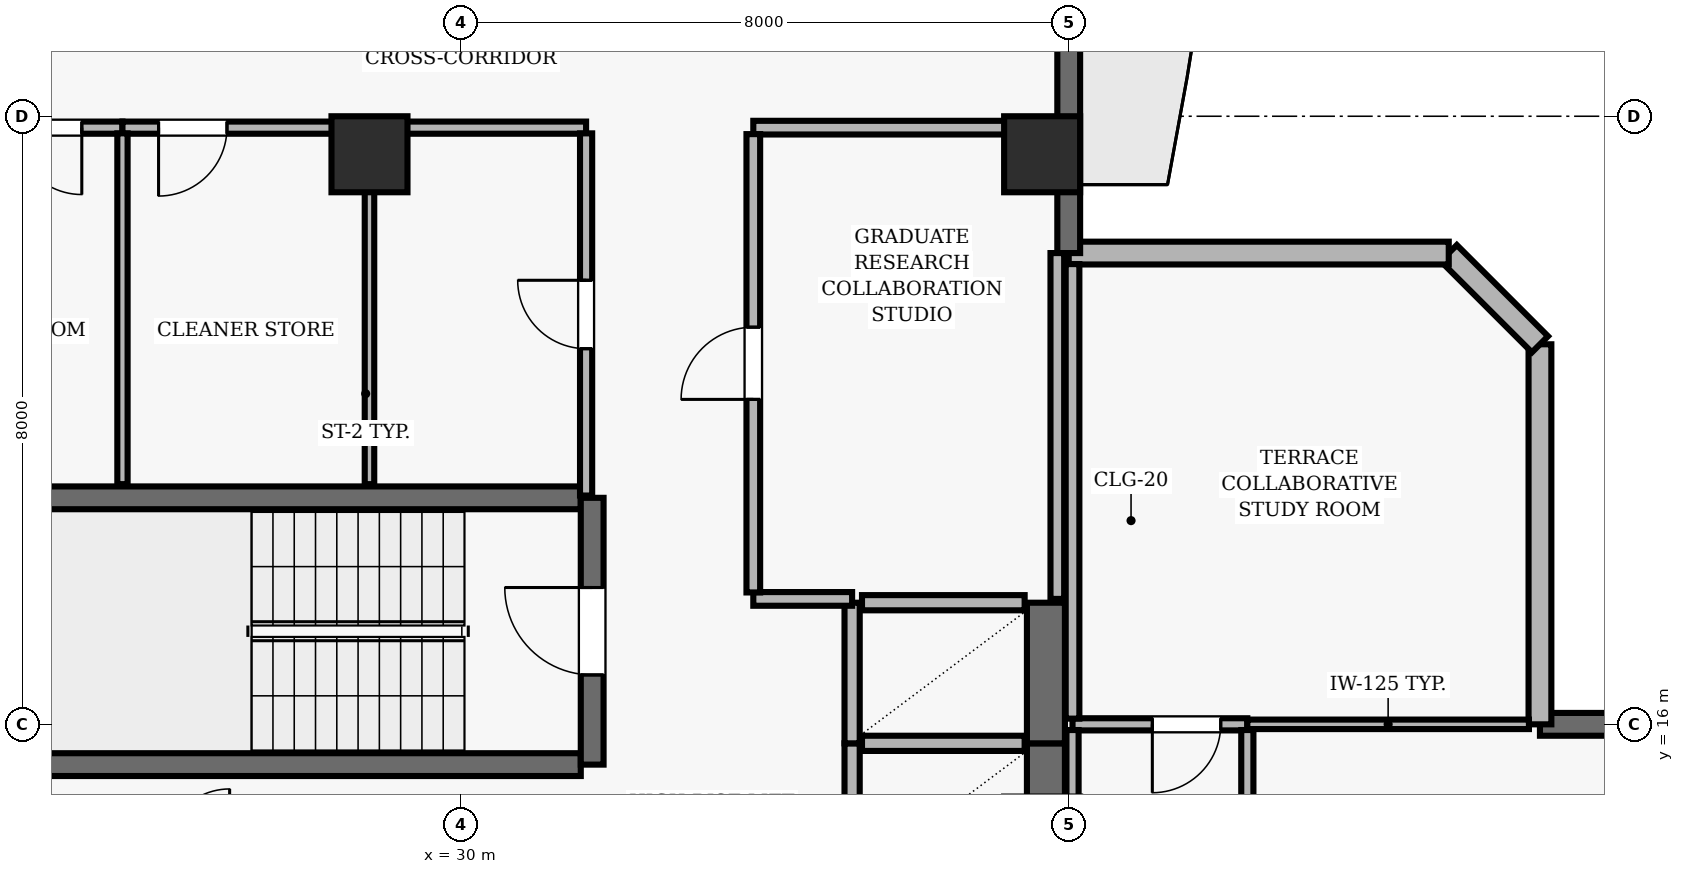
"""IFC4 building model, lengths in metres.
Left out: names, types, materials, properties, quantities, classifications, styles, units other than length and angle.
Written with IfcOpenShell. Run it as: python <this file> out.ifc"""

import sys

from ifc_helpers import new_model, si_unit, direction, frame, frame_2d, origin, origin_2d, place, context, subcontext, project, spatial, rectangle, extrude, element, fill, save


model = new_model("IFC4")
c1 = context("Model", 3, precision=1e-05, world=origin(), true_north=direction((0.0, 1.0)))
c2 = subcontext(c1, "Body", "Model", "MODEL_VIEW")
j1 = project(units=[si_unit("LENGTHUNIT", "METRE"), si_unit("PLANEANGLEUNIT", "RADIAN")], contexts=[c1])
p1 = place(None, origin())
s1 = spatial("IfcSite", under=j1, at=p1, CompositionType="ELEMENT")
p2 = place(p1, origin())
s2 = spatial("IfcBuilding", under=s1, at=p2, CompositionType="ELEMENT")
p3 = place(p2, frame((0.0, 0.0, 218.7)))
s3 = spatial("IfcBuildingStorey", under=s2, at=p3, CompositionType="ELEMENT", Elevation=218.7)
for number, where, z_axis, x_axis in (
    (1, (28.8, 23.5, 0.0), (0.0, 0.0, 1.0), (1.0, 0.0, 0.0)),
    (2, (37.65, 23.5, 0.0), (0.0, 0.0, 1.0), (1.0, 0.0, 0.0)),
):
    element("IfcColumn", number, at=place(p3, frame(where, z_axis=z_axis, x_axis=x_axis)), inside=s3, PredefinedType="COLUMN", context=c2, shape_type="SweptSolid", body=[
        extrude(rectangle(XDim=1.0, YDim=1.0, at=origin_2d()), origin(), (0.0, 0.0, 1.0), 3.9),
    ])
p4 = place(p3, frame((62.7, 16.0, 0.0), z_axis=(0.0, 0.0, 1.0), x_axis=(-1.0, 0.0, 0.0)))
e3 = element("IfcWall", 3, at=p4, inside=s3, PredefinedType="SOLIDWALL", context=c2, shape_type="SweptSolid", body=[
    extrude(rectangle(XDim=18.5, YDim=0.3, at=frame_2d((9.25, 0.0))), origin(), (0.0, 0.0, 1.0), 3.69),
])
p5 = place(p4, frame((7.55, 0.0, 0.0)))
e4 = element("IfcOpeningElement", 4, at=p5, cuts=e3, PredefinedType="OPENING", context=c2, shape_type="SweptSolid", body=[
    extrude(rectangle(XDim=1.0, YDim=2.2, at=frame_2d((0.5, 1.1))), frame((0.0, 0.16, 0.0), z_axis=(0.0, -1.0, 0.0), x_axis=(1.0, 0.0, 0.0)), (0.0, 0.0, 1.0), 0.32),
])
p6 = place(p4, frame((2.183, 0.0, 0.9)))
e5 = element("IfcOpeningElement", 5, at=p6, cuts=e3, PredefinedType="OPENING", context=c2, shape_type="SweptSolid", body=[
    extrude(rectangle(XDim=1.8, YDim=2.2, at=frame_2d((0.9, 1.1))), frame((0.0, 0.16, 0.0), z_axis=(0.0, -1.0, 0.0), x_axis=(1.0, 0.0, 0.0)), (0.0, 0.0, 1.0), 0.32),
])
p7 = place(p4, frame((9.25, 0.0, 0.9)))
e6 = element("IfcOpeningElement", 6, at=p7, cuts=e3, PredefinedType="OPENING", context=c2, shape_type="SweptSolid", body=[
    extrude(rectangle(XDim=1.8, YDim=2.2, at=frame_2d((0.9, 1.1))), frame((0.0, 0.16, 0.0), z_axis=(0.0, -1.0, 0.0), x_axis=(1.0, 0.0, 0.0)), (0.0, 0.0, 1.0), 0.32),
])
p8 = place(p4, frame((14.517, 0.0, 0.9)))
e7 = element("IfcOpeningElement", 7, at=p8, cuts=e3, PredefinedType="OPENING", context=c2, shape_type="SweptSolid", body=[
    extrude(rectangle(XDim=1.8, YDim=2.2, at=frame_2d((0.9, 1.1))), frame((0.0, 0.16, 0.0), z_axis=(0.0, -1.0, 0.0), x_axis=(1.0, 0.0, 0.0)), (0.0, 0.0, 1.0), 0.32),
])
p9 = place(p3, frame((44.2, 16.0, 0.0), z_axis=(0.0, 0.0, 1.0), x_axis=(0.0, 1.0, 0.0)))
e8 = element("IfcWall", 8, at=p9, inside=s3, PredefinedType="SOLIDWALL", context=c2, shape_type="SweptSolid", body=[
    extrude(rectangle(XDim=5.0, YDim=0.3, at=frame_2d((2.5, 0.0))), origin(), (0.0, 0.0, 1.0), 3.69),
])
p10 = place(p3, frame((44.2, 21.0, 0.0), z_axis=(0.0, 0.0, 1.0), x_axis=(-0.707106781187, 0.707106781187, 0.0)))
e9 = element("IfcWall", 9, at=p10, inside=s3, PredefinedType="SOLIDWALL", context=c2, shape_type="SweptSolid", body=[
    extrude(rectangle(XDim=1.697, YDim=0.3, at=frame_2d((0.849, 0.0))), origin(), (0.0, 0.0, 1.0), 3.69),
])
p11 = place(p3, frame((43.0, 22.2, 0.0), z_axis=(0.0, 0.0, 1.0), x_axis=(-1.0, 0.0, 0.0)))
e10 = element("IfcWall", 10, at=p11, inside=s3, PredefinedType="SOLIDWALL", context=c2, shape_type="SweptSolid", body=[
    extrude(rectangle(XDim=5.0, YDim=0.3, at=frame_2d((2.5, 0.0))), origin(), (0.0, 0.0, 1.0), 3.69),
])
p12 = place(p3, frame((38.0, 22.2, 0.0), z_axis=(0.0, 0.0, 1.0), x_axis=(0.0, 1.0, 0.0)))
e11 = element("IfcWall", 11, at=p12, inside=s3, PredefinedType="SOLIDWALL", context=c2, shape_type="SweptSolid", body=[
    extrude(rectangle(XDim=18.5, YDim=0.3, at=frame_2d((9.25, 0.0))), origin(), (0.0, 0.0, 1.0), 3.69),
])
p13 = place(p12, frame((9.95, 0.0, 0.0)))
e12 = element("IfcOpeningElement", 12, at=p13, cuts=e11, PredefinedType="OPENING", context=c2, shape_type="SweptSolid", body=[
    extrude(rectangle(XDim=1.0, YDim=2.2, at=frame_2d((0.5, 1.1))), frame((0.0, 0.16, 0.0), z_axis=(0.0, -1.0, 0.0), x_axis=(1.0, 0.0, 0.0)), (0.0, 0.0, 1.0), 0.32),
])
p14 = place(p12, frame((14.667, 0.0, 0.9)))
e13 = element("IfcOpeningElement", 13, at=p14, cuts=e11, PredefinedType="OPENING", context=c2, shape_type="SweptSolid", body=[
    extrude(rectangle(XDim=1.5, YDim=1.6, at=frame_2d((0.75, 0.8))), frame((0.0, 0.16, 0.0), z_axis=(0.0, -1.0, 0.0), x_axis=(1.0, 0.0, 0.0)), (0.0, 0.0, 1.0), 0.32),
])
for number, where, z_axis, x_axis in (
    (14, (31.58, 18.98, 0.0), (0.0, 0.0, 1.0), (-1.0, 0.0, 0.0)),
    (15, (23.22, 15.47, 0.0), (0.0, 0.0, 1.0), (1.0, 0.0, 0.0)),
):
    element("IfcWall", number, at=place(p3, frame(where, z_axis=z_axis, x_axis=x_axis)), inside=s3, PredefinedType="SHEAR", context=c2, shape_type="SweptSolid", body=[
        extrude(rectangle(XDim=8.36, YDim=0.3, at=frame_2d((4.18, 0.0))), origin(), (0.0, 0.0, 1.0), 3.69),
    ])
p15 = place(p3, frame((31.73, 15.47, 0.0), z_axis=(0.0, 0.0, 1.0), x_axis=(0.0, 1.0, 0.0)))
e16 = element("IfcWall", 16, at=p15, inside=s3, PredefinedType="SHEAR", context=c2, shape_type="SweptSolid", body=[
    extrude(rectangle(XDim=3.51, YDim=0.3, at=frame_2d((1.755, 0.0))), origin(), (0.0, 0.0, 1.0), 3.69),
])
p16 = place(p15, frame((1.18, 0.0, 0.0)))
e17 = element("IfcOpeningElement", 17, at=p16, cuts=e16, PredefinedType="OPENING", context=c2, shape_type="SweptSolid", body=[
    extrude(rectangle(XDim=1.15, YDim=2.15, at=frame_2d((0.575, 1.075))), frame((0.0, 0.16, 0.0), z_axis=(0.0, -1.0, 0.0), x_axis=(1.0, 0.0, 0.0)), (0.0, 0.0, 1.0), 0.32),
])
p17 = place(p3, frame((35.15, 15.75, 0.0), z_axis=(0.0, 0.0, 1.0), x_axis=(0.0, -1.0, 0.0)))
e18 = element("IfcWall", 18, at=p17, inside=s3, PredefinedType="SOLIDWALL", context=c2, shape_type="SweptSolid", body=[
    extrude(rectangle(XDim=1.85, YDim=0.2, at=frame_2d((0.925, 0.0))), origin(), (0.0, 0.0, 1.0), 3.69),
])
p18 = place(p3, frame((37.7, 13.9, 0.0), z_axis=(0.0, 0.0, 1.0), x_axis=(0.0, 1.0, 0.0)))
e19 = element("IfcWall", 19, at=p18, inside=s3, PredefinedType="SHEAR", context=c2, shape_type="SweptSolid", body=[
    extrude(rectangle(XDim=1.85, YDim=0.5, at=frame_2d((0.925, 0.0))), origin(), (0.0, 0.0, 1.0), 3.69),
])
p19 = place(p3, frame((37.42, 15.75, 0.0), z_axis=(0.0, 0.0, 1.0), x_axis=(-1.0, 0.0, 0.0)))
e20 = element("IfcWall", 20, at=p19, inside=s3, PredefinedType="SOLIDWALL", context=c2, shape_type="SweptSolid", body=[
    extrude(rectangle(XDim=2.14, YDim=0.2, at=frame_2d((1.07, 0.0))), origin(), (0.0, 0.0, 1.0), 3.69),
])
p20 = place(p3, frame((35.15, 17.6, 0.0), z_axis=(0.0, 0.0, 1.0), x_axis=(0.0, -1.0, 0.0)))
e21 = element("IfcWall", 21, at=p20, inside=s3, PredefinedType="SOLIDWALL", context=c2, shape_type="SweptSolid", body=[
    extrude(rectangle(XDim=1.85, YDim=0.2, at=frame_2d((0.925, 0.0))), origin(), (0.0, 0.0, 1.0), 3.69),
])
p21 = place(p3, frame((37.7, 15.75, 0.0), z_axis=(0.0, 0.0, 1.0), x_axis=(0.0, 1.0, 0.0)))
e22 = element("IfcWall", 22, at=p21, inside=s3, PredefinedType="SHEAR", context=c2, shape_type="SweptSolid", body=[
    extrude(rectangle(XDim=1.85, YDim=0.5, at=frame_2d((0.925, 0.0))), origin(), (0.0, 0.0, 1.0), 3.69),
])
p22 = place(p3, frame((37.42, 17.6, 0.0), z_axis=(0.0, 0.0, 1.0), x_axis=(-1.0, 0.0, 0.0)))
e23 = element("IfcWall", 23, at=p22, inside=s3, PredefinedType="SOLIDWALL", context=c2, shape_type="SweptSolid", body=[
    extrude(rectangle(XDim=2.14, YDim=0.2, at=frame_2d((1.07, 0.0))), origin(), (0.0, 0.0, 1.0), 3.69),
])
p23 = place(p3, frame((25.55, 23.85, 0.0), z_axis=(0.0, 0.0, 1.0), x_axis=(-1.0, 0.0, 0.0)))
e24 = element("IfcWall", 24, at=p23, inside=s3, PredefinedType="PARTITIONING", context=c2, shape_type="SweptSolid", body=[
    extrude(rectangle(XDim=3.35, YDim=0.16, at=frame_2d((1.675, 0.0))), origin(), (0.0, 0.0, 1.0), 3.146),
])
p24 = place(p23, frame((0.535, 0.0, 0.0)))
e25 = element("IfcOpeningElement", 25, at=p24, cuts=e24, PredefinedType="OPENING", context=c2, shape_type="SweptSolid", body=[
    extrude(rectangle(XDim=0.88, YDim=2.1, at=frame_2d((0.44, 1.05))), frame((0.0, 0.09, 0.0), z_axis=(0.0, -1.0, 0.0), x_axis=(1.0, 0.0, 0.0)), (0.0, 0.0, 1.0), 0.18),
])
p25 = place(p3, frame((28.8, 23.85, 0.0), z_axis=(0.0, 0.0, 1.0), x_axis=(-1.0, 0.0, 0.0)))
e26 = element("IfcWall", 26, at=p25, inside=s3, PredefinedType="PARTITIONING", context=c2, shape_type="SweptSolid", body=[
    extrude(rectangle(XDim=3.25, YDim=0.16, at=frame_2d((1.625, 0.0))), origin(), (0.0, 0.0, 1.0), 3.146),
])
p26 = place(p25, frame((1.875, 0.0, 0.0)))
e27 = element("IfcOpeningElement", 27, at=p26, cuts=e26, PredefinedType="OPENING", context=c2, shape_type="SweptSolid", body=[
    extrude(rectangle(XDim=0.9, YDim=2.1, at=frame_2d((0.45, 1.05))), frame((0.0, 0.09, 0.0), z_axis=(0.0, -1.0, 0.0), x_axis=(1.0, 0.0, 0.0)), (0.0, 0.0, 1.0), 0.18),
])
p27 = place(p3, frame((31.65, 23.85, 0.0), z_axis=(0.0, 0.0, 1.0), x_axis=(-1.0, 0.0, 0.0)))
e28 = element("IfcWall", 28, at=p27, inside=s3, PredefinedType="PARTITIONING", context=c2, shape_type="SweptSolid", body=[
    extrude(rectangle(XDim=2.85, YDim=0.16, at=frame_2d((1.425, 0.0))), origin(), (0.0, 0.0, 1.0), 3.146),
])
p28 = place(p3, frame((33.85, 17.65, 0.0), z_axis=(0.0, 0.0, 1.0), x_axis=(1.0, 0.0, 0.0)))
e29 = element("IfcWall", 29, at=p28, inside=s3, PredefinedType="PARTITIONING", context=c2, shape_type="SweptSolid", body=[
    extrude(rectangle(XDim=1.3, YDim=0.18, at=frame_2d((0.65, 0.0))), origin(), (0.0, 0.0, 1.0), 3.69),
])
p29 = place(p3, frame((37.85, 23.85, 0.0), z_axis=(0.0, 0.0, 1.0), x_axis=(-1.0, 0.0, 0.0)))
e30 = element("IfcWall", 30, at=p29, inside=s3, PredefinedType="PARTITIONING", context=c2, shape_type="SweptSolid", body=[
    extrude(rectangle(XDim=4.0, YDim=0.18, at=frame_2d((2.0, 0.0))), origin(), (0.0, 0.0, 1.0), 3.146),
])
p30 = place(p3, frame((40.35, 16.0, 0.0), z_axis=(0.0, 0.0, 1.0), x_axis=(-1.0, 0.0, 0.0)))
e31 = element("IfcWall", 31, at=p30, inside=s3, PredefinedType="PARTITIONING", context=c2, shape_type="SweptSolid", body=[
    extrude(rectangle(XDim=2.3, YDim=0.16, at=frame_2d((1.15, 0.0))), origin(), (0.0, 0.0, 1.0), 3.39),
])
p31 = place(p30, frame((0.35, 0.0, 0.0)))
e32 = element("IfcOpeningElement", 32, at=p31, cuts=e31, PredefinedType="OPENING", context=c2, shape_type="SweptSolid", body=[
    extrude(rectangle(XDim=0.9, YDim=2.1, at=frame_2d((0.45, 1.05))), frame((0.0, 0.09, 0.0), z_axis=(0.0, -1.0, 0.0), x_axis=(1.0, 0.0, 0.0)), (0.0, 0.0, 1.0), 0.18),
])
p32 = place(p3, frame((40.35, 16.0, 0.0), z_axis=(0.0, 0.0, 1.0), x_axis=(1.0, 0.0, 0.0)))
e33 = element("IfcWall", 33, at=p32, inside=s3, PredefinedType="PARTITIONING", context=c2, shape_type="SweptSolid", body=[
    extrude(rectangle(XDim=3.705, YDim=0.125, at=frame_2d((1.853, 0.0))), origin(), (0.0, 0.0, 1.0), 3.39),
])
p33 = place(p3, frame((25.55, 19.16, 0.0), z_axis=(0.0, 0.0, 1.0), x_axis=(0.0, 1.0, 0.0)))
e34 = element("IfcWall", 34, at=p33, inside=s3, PredefinedType="PARTITIONING", context=c2, shape_type="SweptSolid", body=[
    extrude(rectangle(XDim=4.615, YDim=0.135, at=frame_2d((2.308, 0.0))), origin(), (0.0, 0.0, 1.0), 3.69),
])
p34 = place(p3, frame((28.8, 23.775, 0.0), z_axis=(0.0, 0.0, 1.0), x_axis=(0.0, -1.0, 0.0)))
e35 = element("IfcWall", 35, at=p34, inside=s3, PredefinedType="PARTITIONING", context=c2, shape_type="SweptSolid", body=[
    extrude(rectangle(XDim=4.615, YDim=0.125, at=frame_2d((2.308, 0.0))), origin(), (0.0, 0.0, 1.0), 3.69),
])
p35 = place(p3, frame((31.65, 19.01, 0.0), z_axis=(0.0, 0.0, 1.0), x_axis=(0.0, 1.0, 0.0)))
e36 = element("IfcWall", 36, at=p35, inside=s3, PredefinedType="PARTITIONING", context=c2, shape_type="SweptSolid", body=[
    extrude(rectangle(XDim=4.765, YDim=0.16, at=frame_2d((2.382, 0.0))), origin(), (0.0, 0.0, 1.0), 3.69),
])
p36 = place(p35, frame((1.932, 0.0, 0.0)))
e37 = element("IfcOpeningElement", 37, at=p36, cuts=e36, PredefinedType="OPENING", context=c2, shape_type="SweptSolid", body=[
    extrude(rectangle(XDim=0.9, YDim=2.1, at=frame_2d((0.45, 1.05))), frame((0.0, 0.09, 0.0), z_axis=(0.0, -1.0, 0.0), x_axis=(1.0, 0.0, 0.0)), (0.0, 0.0, 1.0), 0.18),
])
p37 = place(p3, frame((33.85, 17.735, 0.0), z_axis=(0.0, 0.0, 1.0), x_axis=(0.0, 1.0, 0.0)))
e38 = element("IfcWall", 38, at=p37, inside=s3, PredefinedType="PARTITIONING", context=c2, shape_type="SweptSolid", body=[
    extrude(rectangle(XDim=6.03, YDim=0.18, at=frame_2d((3.015, 0.0))), origin(), (0.0, 0.0, 1.0), 3.69),
])
p38 = place(p37, frame((2.54, 0.0, 0.0)))
e39 = element("IfcOpeningElement", 39, at=p38, cuts=e38, PredefinedType="OPENING", context=c2, shape_type="SweptSolid", body=[
    extrude(rectangle(XDim=0.95, YDim=2.1, at=frame_2d((0.475, 1.05))), frame((0.0, 0.1, 0.0), z_axis=(0.0, -1.0, 0.0), x_axis=(1.0, 0.0, 0.0)), (0.0, 0.0, 1.0), 0.2),
])
p39 = place(p3, frame((37.85, 17.65, 0.0), z_axis=(0.0, 0.0, 1.0), x_axis=(0.0, 1.0, 0.0)))
e40 = element("IfcWall", 40, at=p39, inside=s3, PredefinedType="PARTITIONING", context=c2, shape_type="SweptSolid", body=[
    extrude(rectangle(XDim=4.55, YDim=0.18, at=frame_2d((2.275, 0.0))), origin(), (0.0, 0.0, 1.0), 3.146),
])
p40 = place(p3, frame((38.05, 15.925, 0.0), z_axis=(0.0, 0.0, 1.0), x_axis=(0.0, -1.0, 0.0)))
e41 = element("IfcWall", 41, at=p40, inside=s3, PredefinedType="PARTITIONING", context=c2, shape_type="SweptSolid", body=[
    extrude(rectangle(XDim=6.375, YDim=0.16, at=frame_2d((3.188, 0.0))), origin(), (0.0, 0.0, 1.0), 3.146),
])
p41 = place(p3, frame((38.05, 22.055, 0.0), z_axis=(0.0, 0.0, 1.0), x_axis=(0.0, -1.0, 0.0)))
e42 = element("IfcWall", 42, at=p41, inside=s3, PredefinedType="PARTITIONING", context=c2, shape_type="SweptSolid", body=[
    extrude(rectangle(XDim=5.98, YDim=0.18, at=frame_2d((2.99, 0.0))), origin(), (0.0, 0.0, 1.0), 3.146),
])
p42 = place(p3, frame((40.35, 7.625, 0.0), z_axis=(0.0, 0.0, 1.0), x_axis=(0.0, 1.0, 0.0)))
e43 = element("IfcWall", 43, at=p42, inside=s3, PredefinedType="PARTITIONING", context=c2, shape_type="SweptSolid", body=[
    extrude(rectangle(XDim=8.3, YDim=0.16, at=frame_2d((4.15, 0.0))), origin(), (0.0, 0.0, 1.0), 3.69),
])
p43 = place(p16, origin())
e44 = element("IfcDoor", 44, at=p43, inside=s3, OperationType="SINGLE_SWING_RIGHT", PredefinedType="DOOR", context=c2, shape_type="SweptSolid", body=[
    extrude(rectangle(XDim=1.15, YDim=2.15, at=frame_2d((0.575, 1.075))), frame((0.0, 0.025, 0.0), z_axis=(0.0, -1.0, 0.0), x_axis=(1.0, 0.0, 0.0)), (0.0, 0.0, 1.0), 0.05),
])
fill(e17, e44)
p44 = place(p38, origin())
e45 = element("IfcDoor", 45, at=p44, inside=s3, OperationType="SINGLE_SWING_LEFT", PredefinedType="DOOR", context=c2, shape_type="SweptSolid", body=[
    extrude(rectangle(XDim=0.95, YDim=2.1, at=frame_2d((0.475, 1.05))), frame((0.0, 0.025, 0.0), z_axis=(0.0, -1.0, 0.0), x_axis=(1.0, 0.0, 0.0)), (0.0, 0.0, 1.0), 0.05),
])
fill(e39, e45)
p45 = place(p36, origin())
e46 = element("IfcDoor", 46, at=p45, inside=s3, OperationType="SINGLE_SWING_RIGHT", PredefinedType="DOOR", context=c2, shape_type="SweptSolid", body=[
    extrude(rectangle(XDim=0.9, YDim=2.1, at=frame_2d((0.45, 1.05))), frame((0.0, 0.025, 0.0), z_axis=(0.0, -1.0, 0.0), x_axis=(1.0, 0.0, 0.0)), (0.0, 0.0, 1.0), 0.05),
])
fill(e37, e46)
p46 = place(p24, origin())
e47 = element("IfcDoor", 47, at=p46, inside=s3, OperationType="SINGLE_SWING_LEFT", PredefinedType="DOOR", context=c2, shape_type="SweptSolid", body=[
    extrude(rectangle(XDim=0.88, YDim=2.1, at=frame_2d((0.44, 1.05))), frame((0.0, 0.025, 0.0), z_axis=(0.0, -1.0, 0.0), x_axis=(1.0, 0.0, 0.0)), (0.0, 0.0, 1.0), 0.05),
])
fill(e25, e47)
p47 = place(p26, origin())
e48 = element("IfcDoor", 48, at=p47, inside=s3, OperationType="SINGLE_SWING_RIGHT", PredefinedType="DOOR", context=c2, shape_type="SweptSolid", body=[
    extrude(rectangle(XDim=0.9, YDim=2.1, at=frame_2d((0.45, 1.05))), frame((0.0, 0.025, 0.0), z_axis=(0.0, -1.0, 0.0), x_axis=(1.0, 0.0, 0.0)), (0.0, 0.0, 1.0), 0.05),
])
fill(e27, e48)
p48 = place(p31, origin())
e49 = element("IfcDoor", 49, at=p48, inside=s3, OperationType="SINGLE_SWING_RIGHT", PredefinedType="DOOR", context=c2, shape_type="SweptSolid", body=[
    extrude(rectangle(XDim=0.9, YDim=2.1, at=frame_2d((0.45, 1.05))), frame((0.0, 0.025, 0.0), z_axis=(0.0, -1.0, 0.0), x_axis=(1.0, 0.0, 0.0)), (0.0, 0.0, 1.0), 0.05),
])
fill(e32, e49)
save(model, sys.argv[1])
